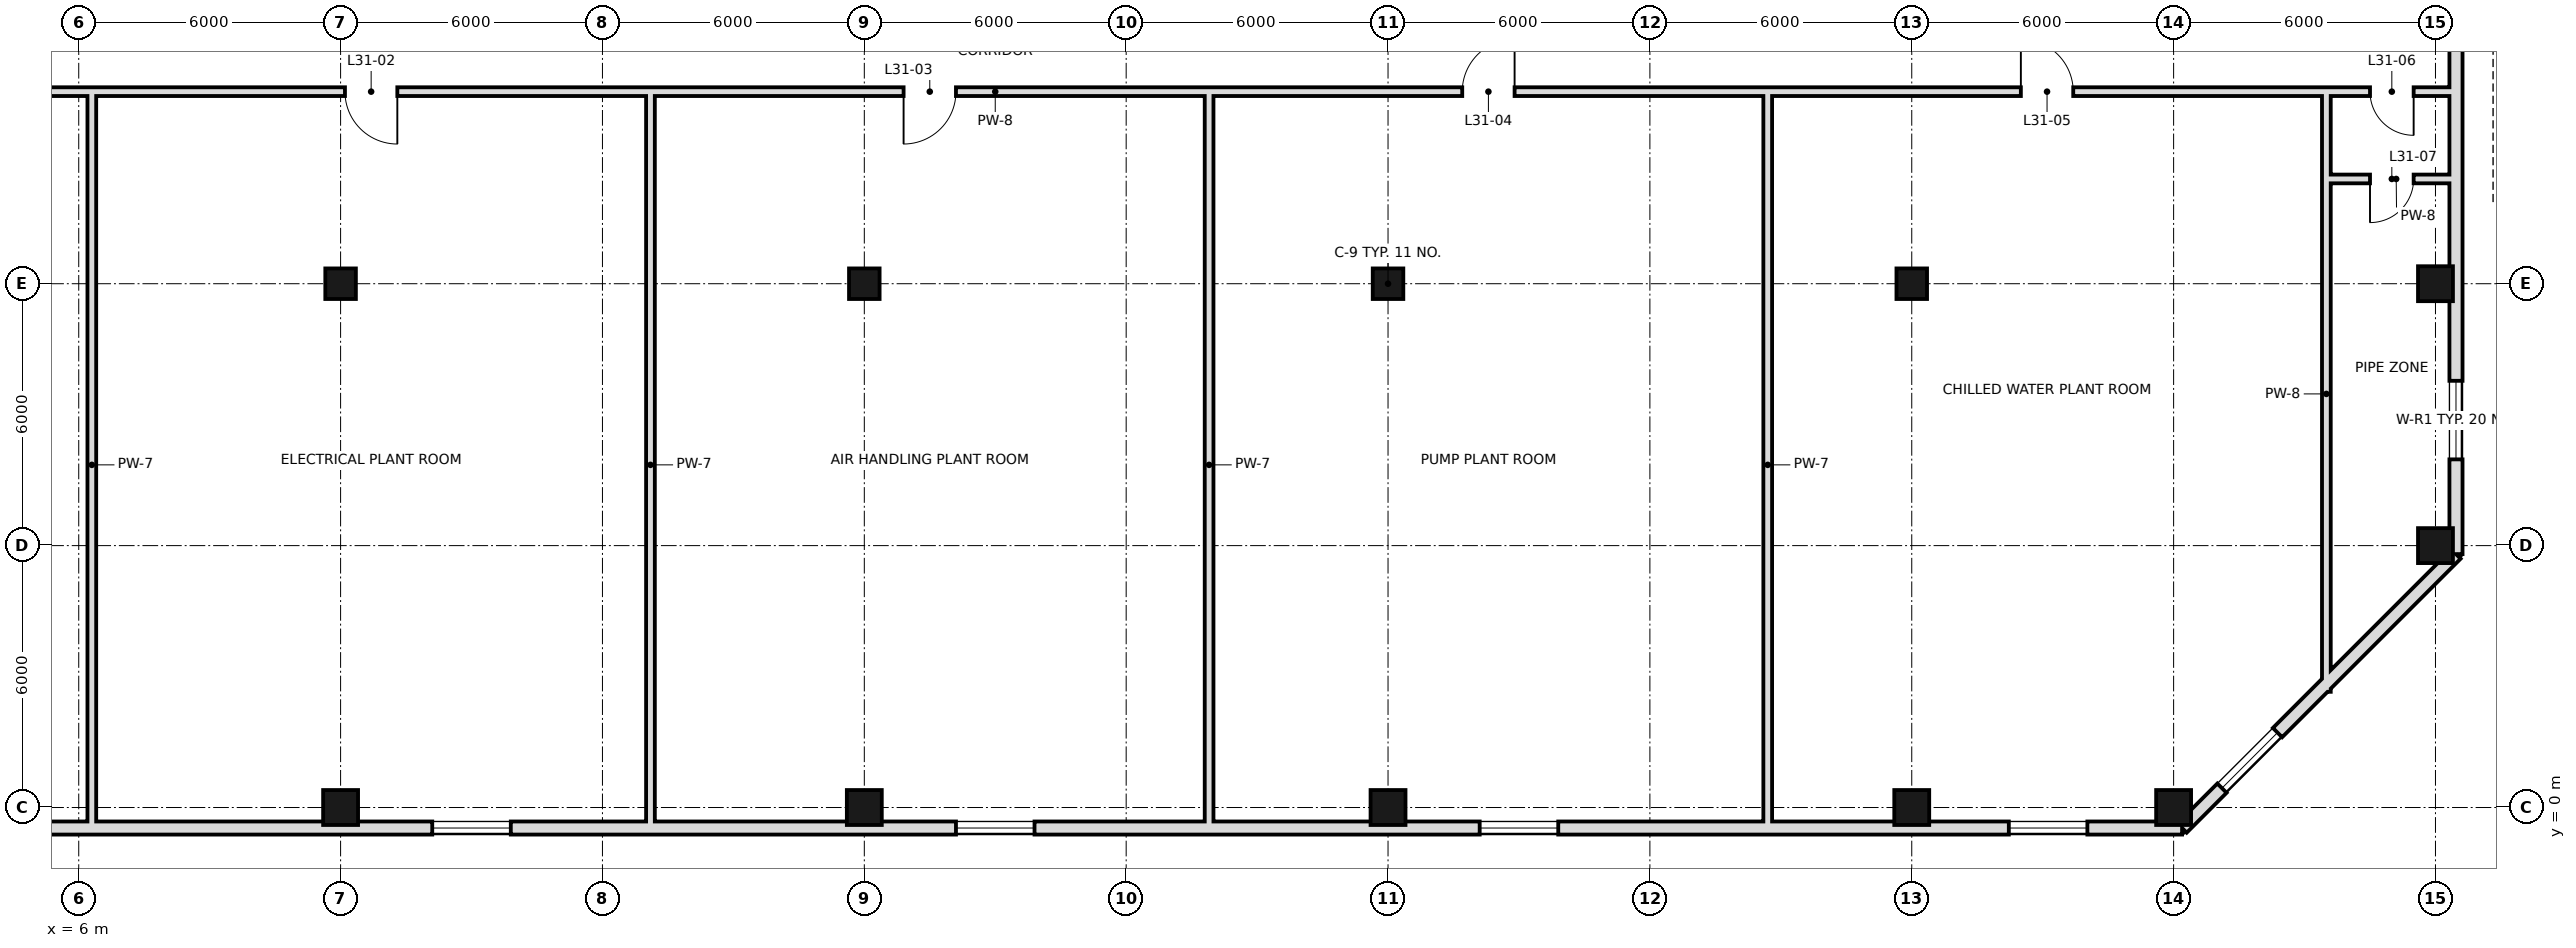
"""IFC4 building model, lengths in metres.
Left out: names, types, materials, properties, quantities, classifications, styles, units other than length and angle.
Written with IfcOpenShell. Run it as: python <this file> out.ifc"""

import sys

from ifc_helpers import new_model, si_unit, direction, frame, frame_2d, origin, origin_2d, place, context, subcontext, project, spatial, rectangle, hollow_rectangle, extrude, element, fill, save


model = new_model("IFC4")
c1 = context("Model", 3, precision=1e-05, world=origin(), true_north=direction((0.0, 1.0)))
c2 = subcontext(c1, "Body", "Model", "MODEL_VIEW")
j1 = project(units=[si_unit("LENGTHUNIT", "METRE"), si_unit("PLANEANGLEUNIT", "RADIAN")], contexts=[c1])
p1 = place(None, origin())
s1 = spatial("IfcSite", under=j1, at=p1, CompositionType="ELEMENT")
p2 = place(p1, origin())
s2 = spatial("IfcBuilding", under=s1, at=p2, CompositionType="ELEMENT")
p3 = place(p2, frame((0.0, 0.0, 138.4)))
s3 = spatial("IfcBuildingStorey", under=s2, at=p3, CompositionType="ELEMENT", Elevation=138.4)
p4 = place(p3, frame((12.0, 0.0, 0.0), z_axis=(0.0, 0.0, 1.0), x_axis=(1.0, 0.0, 0.0)))
e1 = element("IfcColumn", 1, at=p4, inside=s3, PredefinedType="COLUMN", context=c2, shape_type="SweptSolid", body=[
    extrude(hollow_rectangle(XDim=0.8, YDim=0.8, WallThickness=0.04, at=origin_2d()), origin(), (0.0, 0.0, 1.0), 5.4),
])
p5 = place(p3, frame((12.0, 12.0, 0.0), z_axis=(0.0, 0.0, 1.0), x_axis=(1.0, 0.0, 0.0)))
e2 = element("IfcColumn", 2, at=p5, inside=s3, PredefinedType="COLUMN", context=c2, shape_type="SweptSolid", body=[
    extrude(hollow_rectangle(XDim=0.7, YDim=0.7, WallThickness=0.036, at=origin_2d()), origin(), (0.0, 0.0, 1.0), 5.4),
])
p6 = place(p3, frame((24.0, 0.0, 0.0), z_axis=(0.0, 0.0, 1.0), x_axis=(1.0, 0.0, 0.0)))
e3 = element("IfcColumn", 3, at=p6, inside=s3, PredefinedType="COLUMN", context=c2, shape_type="SweptSolid", body=[
    extrude(hollow_rectangle(XDim=0.8, YDim=0.8, WallThickness=0.04, at=origin_2d()), origin(), (0.0, 0.0, 1.0), 5.4),
])
p7 = place(p3, frame((24.0, 12.0, 0.0), z_axis=(0.0, 0.0, 1.0), x_axis=(1.0, 0.0, 0.0)))
e4 = element("IfcColumn", 4, at=p7, inside=s3, PredefinedType="COLUMN", context=c2, shape_type="SweptSolid", body=[
    extrude(hollow_rectangle(XDim=0.7, YDim=0.7, WallThickness=0.036, at=origin_2d()), origin(), (0.0, 0.0, 1.0), 5.4),
])
p8 = place(p3, frame((36.0, 0.0, 0.0), z_axis=(0.0, 0.0, 1.0), x_axis=(1.0, 0.0, 0.0)))
e5 = element("IfcColumn", 5, at=p8, inside=s3, PredefinedType="COLUMN", context=c2, shape_type="SweptSolid", body=[
    extrude(hollow_rectangle(XDim=0.8, YDim=0.8, WallThickness=0.04, at=origin_2d()), origin(), (0.0, 0.0, 1.0), 5.4),
])
p9 = place(p3, frame((36.0, 12.0, 0.0), z_axis=(0.0, 0.0, 1.0), x_axis=(1.0, 0.0, 0.0)))
e6 = element("IfcColumn", 6, at=p9, inside=s3, PredefinedType="COLUMN", context=c2, shape_type="SweptSolid", body=[
    extrude(hollow_rectangle(XDim=0.7, YDim=0.7, WallThickness=0.036, at=origin_2d()), origin(), (0.0, 0.0, 1.0), 5.4),
])
p10 = place(p3, frame((48.0, 0.0, 0.0), z_axis=(0.0, 0.0, 1.0), x_axis=(1.0, 0.0, 0.0)))
e7 = element("IfcColumn", 7, at=p10, inside=s3, PredefinedType="COLUMN", context=c2, shape_type="SweptSolid", body=[
    extrude(hollow_rectangle(XDim=0.8, YDim=0.8, WallThickness=0.04, at=origin_2d()), origin(), (0.0, 0.0, 1.0), 5.4),
])
p11 = place(p3, frame((48.0, 12.0, 0.0), z_axis=(0.0, 0.0, 1.0), x_axis=(1.0, 0.0, 0.0)))
e8 = element("IfcColumn", 8, at=p11, inside=s3, PredefinedType="COLUMN", context=c2, shape_type="SweptSolid", body=[
    extrude(hollow_rectangle(XDim=0.7, YDim=0.7, WallThickness=0.036, at=origin_2d()), origin(), (0.0, 0.0, 1.0), 5.4),
])
for number, where, z_axis, x_axis in (
    (9, (54.0, 0.0, 0.0), (0.0, 0.0, 1.0), (1.0, 0.0, 0.0)),
    (10, (60.0, 6.0, 0.0), (0.0, 0.0, 1.0), (1.0, 0.0, 0.0)),
    (11, (60.0, 12.0, 0.0), (0.0, 0.0, 1.0), (1.0, 0.0, 0.0)),
):
    element("IfcColumn", number, at=place(p3, frame(where, z_axis=z_axis, x_axis=x_axis)), inside=s3, PredefinedType="COLUMN", context=c2, shape_type="SweptSolid", body=[
        extrude(hollow_rectangle(XDim=0.8, YDim=0.8, WallThickness=0.04, at=origin_2d()), origin(), (0.0, 0.0, 1.0), 5.4),
    ])
p12 = place(p3, frame((-0.195, -0.47, 0.0), z_axis=(0.0, 0.0, 1.0), x_axis=(1.0, 0.0, 0.0)))
e12 = element("IfcWall", 12, at=p12, inside=s3, PredefinedType="SOLIDWALL", context=c2, shape_type="SweptSolid", body=[
    extrude(rectangle(XDim=54.389, YDim=0.3, at=frame_2d((27.195, 0.0))), origin(), (0.0, 0.0, 1.0), 5.22),
])
p13 = place(p12, frame((2.17, 0.0, 0.9)))
e13 = element("IfcOpeningElement", 13, at=p13, cuts=e12, PredefinedType="OPENING", context=c2, shape_type="SweptSolid", body=[
    extrude(rectangle(XDim=1.8, YDim=1.5, at=frame_2d((0.9, 0.75))), frame((0.0, 0.16, 0.0), z_axis=(0.0, -1.0, 0.0), x_axis=(1.0, 0.0, 0.0)), (0.0, 0.0, 1.0), 0.32),
])
p14 = place(p12, frame((14.295, 0.0, 0.9)))
e14 = element("IfcOpeningElement", 14, at=p14, cuts=e12, PredefinedType="OPENING", context=c2, shape_type="SweptSolid", body=[
    extrude(rectangle(XDim=1.8, YDim=1.5, at=frame_2d((0.9, 0.75))), frame((0.0, 0.16, 0.0), z_axis=(0.0, -1.0, 0.0), x_axis=(1.0, 0.0, 0.0)), (0.0, 0.0, 1.0), 0.32),
])
p15 = place(p12, frame((26.295, 0.0, 0.9)))
e15 = element("IfcOpeningElement", 15, at=p15, cuts=e12, PredefinedType="OPENING", context=c2, shape_type="SweptSolid", body=[
    extrude(rectangle(XDim=1.8, YDim=1.5, at=frame_2d((0.9, 0.75))), frame((0.0, 0.16, 0.0), z_axis=(0.0, -1.0, 0.0), x_axis=(1.0, 0.0, 0.0)), (0.0, 0.0, 1.0), 0.32),
])
p16 = place(p12, frame((38.295, 0.0, 0.9)))
e16 = element("IfcOpeningElement", 16, at=p16, cuts=e12, PredefinedType="OPENING", context=c2, shape_type="SweptSolid", body=[
    extrude(rectangle(XDim=1.8, YDim=1.5, at=frame_2d((0.9, 0.75))), frame((0.0, 0.16, 0.0), z_axis=(0.0, -1.0, 0.0), x_axis=(1.0, 0.0, 0.0)), (0.0, 0.0, 1.0), 0.32),
])
p17 = place(p12, frame((50.419, 0.0, 0.9)))
e17 = element("IfcOpeningElement", 17, at=p17, cuts=e12, PredefinedType="OPENING", context=c2, shape_type="SweptSolid", body=[
    extrude(rectangle(XDim=1.8, YDim=1.5, at=frame_2d((0.9, 0.75))), frame((0.0, 0.16, 0.0), z_axis=(0.0, -1.0, 0.0), x_axis=(1.0, 0.0, 0.0)), (0.0, 0.0, 1.0), 0.32),
])
p18 = place(p3, frame((54.195, -0.47, 0.0), z_axis=(0.0, 0.0, 1.0), x_axis=(0.707106781187, 0.707106781187, 0.0)))
e18 = element("IfcWall", 18, at=p18, inside=s3, PredefinedType="SOLIDWALL", context=c2, shape_type="SweptSolid", body=[
    extrude(rectangle(XDim=8.875, YDim=0.3, at=frame_2d((4.438, 0.0))), origin(), (0.0, 0.0, 1.0), 5.22),
])
p19 = place(p18, frame((1.292, 0.0, 0.9)))
e19 = element("IfcOpeningElement", 19, at=p19, cuts=e18, PredefinedType="OPENING", context=c2, shape_type="SweptSolid", body=[
    extrude(rectangle(XDim=1.8, YDim=1.5, at=frame_2d((0.9, 0.75))), frame((0.0, 0.16, 0.0), z_axis=(0.0, -1.0, 0.0), x_axis=(1.0, 0.0, 0.0)), (0.0, 0.0, 1.0), 0.32),
])
p20 = place(p3, frame((60.47, 5.805, 0.0), z_axis=(0.0, 0.0, 1.0), x_axis=(0.0, 1.0, 0.0)))
e20 = element("IfcWall", 20, at=p20, inside=s3, PredefinedType="SOLIDWALL", context=c2, shape_type="SweptSolid", body=[
    extrude(rectangle(XDim=36.389, YDim=0.3, at=frame_2d((18.195, 0.0))), origin(), (0.0, 0.0, 1.0), 5.22),
])
p21 = place(p20, frame((2.17, 0.0, 0.9)))
e21 = element("IfcOpeningElement", 21, at=p21, cuts=e20, PredefinedType="OPENING", context=c2, shape_type="SweptSolid", body=[
    extrude(rectangle(XDim=1.8, YDim=1.5, at=frame_2d((0.9, 0.75))), frame((0.0, 0.16, 0.0), z_axis=(0.0, -1.0, 0.0), x_axis=(1.0, 0.0, 0.0)), (0.0, 0.0, 1.0), 0.32),
])
p22 = place(p20, frame((14.295, 0.0, 0.9)))
e22 = element("IfcOpeningElement", 22, at=p22, cuts=e20, PredefinedType="OPENING", context=c2, shape_type="SweptSolid", body=[
    extrude(rectangle(XDim=1.8, YDim=1.5, at=frame_2d((0.9, 0.75))), frame((0.0, 0.16, 0.0), z_axis=(0.0, -1.0, 0.0), x_axis=(1.0, 0.0, 0.0)), (0.0, 0.0, 1.0), 0.32),
])
p23 = place(p20, frame((26.295, 0.0, 0.9)))
e23 = element("IfcOpeningElement", 23, at=p23, cuts=e20, PredefinedType="OPENING", context=c2, shape_type="SweptSolid", body=[
    extrude(rectangle(XDim=1.8, YDim=1.5, at=frame_2d((0.9, 0.75))), frame((0.0, 0.16, 0.0), z_axis=(0.0, -1.0, 0.0), x_axis=(1.0, 0.0, 0.0)), (0.0, 0.0, 1.0), 0.32),
])
for number, where, z_axis, x_axis in (
    (24, (6.3, -0.6, 0.0), (0.0, 0.0, 1.0), (0.0, 1.0, 0.0)),
    (25, (19.1, -0.6, 0.0), (0.0, 0.0, 1.0), (0.0, 1.0, 0.0)),
    (26, (31.9, -0.6, 0.0), (0.0, 0.0, 1.0), (0.0, 1.0, 0.0)),
    (27, (44.7, -0.6, 0.0), (0.0, 0.0, 1.0), (0.0, 1.0, 0.0)),
):
    element("IfcWall", number, at=place(p3, frame(where, z_axis=z_axis, x_axis=x_axis)), inside=s3, PredefinedType="SOLIDWALL", context=c2, shape_type="SweptSolid", body=[
        extrude(rectangle(XDim=16.9, YDim=0.2, at=frame_2d((8.45, 0.0))), origin(), (0.0, 0.0, 1.0), 4.52),
    ])
p24 = place(p3, frame((57.5, 2.651, 0.0), z_axis=(0.0, 0.0, 1.0), x_axis=(0.0, 1.0, 0.0)))
e28 = element("IfcWall", 28, at=p24, inside=s3, PredefinedType="SOLIDWALL", context=c2, shape_type="SweptSolid", body=[
    extrude(rectangle(XDim=13.649, YDim=0.2, at=frame_2d((6.825, 0.0))), origin(), (0.0, 0.0, 1.0), 4.52),
])
p25 = place(p3, frame((57.6, 14.4, 0.0), z_axis=(0.0, 0.0, 1.0), x_axis=(1.0, 0.0, 0.0)))
e29 = element("IfcWall", 29, at=p25, inside=s3, PredefinedType="SOLIDWALL", context=c2, shape_type="SweptSolid", body=[
    extrude(rectangle(XDim=3.0, YDim=0.2, at=frame_2d((1.5, 0.0))), origin(), (0.0, 0.0, 1.0), 4.52),
])
p26 = place(p25, frame((0.9, 0.0, 0.0)))
e30 = element("IfcOpeningElement", 30, at=p26, cuts=e29, PredefinedType="OPENING", context=c2, shape_type="SweptSolid", body=[
    extrude(rectangle(XDim=1.0, YDim=2.4, at=frame_2d((0.5, 1.2))), frame((0.0, 0.11, 0.0), z_axis=(0.0, -1.0, 0.0), x_axis=(1.0, 0.0, 0.0)), (0.0, 0.0, 1.0), 0.22),
])
p27 = place(p3, frame((-6.6, 16.4, 0.0), z_axis=(0.0, 0.0, 1.0), x_axis=(1.0, 0.0, 0.0)))
e31 = element("IfcWall", 31, at=p27, inside=s3, PredefinedType="SOLIDWALL", context=c2, shape_type="SweptSolid", body=[
    extrude(rectangle(XDim=67.2, YDim=0.2, at=frame_2d((33.6, 0.0))), origin(), (0.0, 0.0, 1.0), 4.52),
])
p28 = place(p27, frame((5.9, 0.0, 0.0)))
e32 = element("IfcOpeningElement", 32, at=p28, cuts=e31, PredefinedType="OPENING", context=c2, shape_type="SweptSolid", body=[
    extrude(rectangle(XDim=1.2, YDim=2.4, at=frame_2d((0.6, 1.2))), frame((0.0, 0.11, 0.0), z_axis=(0.0, -1.0, 0.0), x_axis=(1.0, 0.0, 0.0)), (0.0, 0.0, 1.0), 0.22),
])
p29 = place(p27, frame((18.7, 0.0, 0.0)))
e33 = element("IfcOpeningElement", 33, at=p29, cuts=e31, PredefinedType="OPENING", context=c2, shape_type="SweptSolid", body=[
    extrude(rectangle(XDim=1.2, YDim=2.4, at=frame_2d((0.6, 1.2))), frame((0.0, 0.11, 0.0), z_axis=(0.0, -1.0, 0.0), x_axis=(1.0, 0.0, 0.0)), (0.0, 0.0, 1.0), 0.22),
])
p30 = place(p27, frame((31.5, 0.0, 0.0)))
e34 = element("IfcOpeningElement", 34, at=p30, cuts=e31, PredefinedType="OPENING", context=c2, shape_type="SweptSolid", body=[
    extrude(rectangle(XDim=1.2, YDim=2.4, at=frame_2d((0.6, 1.2))), frame((0.0, 0.11, 0.0), z_axis=(0.0, -1.0, 0.0), x_axis=(1.0, 0.0, 0.0)), (0.0, 0.0, 1.0), 0.22),
])
p31 = place(p27, frame((44.3, 0.0, 0.0)))
e35 = element("IfcOpeningElement", 35, at=p31, cuts=e31, PredefinedType="OPENING", context=c2, shape_type="SweptSolid", body=[
    extrude(rectangle(XDim=1.2, YDim=2.4, at=frame_2d((0.6, 1.2))), frame((0.0, 0.11, 0.0), z_axis=(0.0, -1.0, 0.0), x_axis=(1.0, 0.0, 0.0)), (0.0, 0.0, 1.0), 0.22),
])
p32 = place(p27, frame((57.1, 0.0, 0.0)))
e36 = element("IfcOpeningElement", 36, at=p32, cuts=e31, PredefinedType="OPENING", context=c2, shape_type="SweptSolid", body=[
    extrude(rectangle(XDim=1.2, YDim=2.4, at=frame_2d((0.6, 1.2))), frame((0.0, 0.11, 0.0), z_axis=(0.0, -1.0, 0.0), x_axis=(1.0, 0.0, 0.0)), (0.0, 0.0, 1.0), 0.22),
])
p33 = place(p27, frame((65.1, 0.0, 0.0)))
e37 = element("IfcOpeningElement", 37, at=p33, cuts=e31, PredefinedType="OPENING", context=c2, shape_type="SweptSolid", body=[
    extrude(rectangle(XDim=1.0, YDim=2.4, at=frame_2d((0.5, 1.2))), frame((0.0, 0.11, 0.0), z_axis=(0.0, -1.0, 0.0), x_axis=(1.0, 0.0, 0.0)), (0.0, 0.0, 1.0), 0.22),
])
p34 = place(p14, origin())
e38 = element("IfcWindow", 38, at=p34, inside=s3, PartitioningType="SINGLE_PANEL", PredefinedType="WINDOW", context=c2, shape_type="SweptSolid", body=[
    extrude(rectangle(XDim=1.8, YDim=1.5, at=frame_2d((0.9, 0.75))), frame((0.0, 0.03, 0.0), z_axis=(0.0, -1.0, 0.0), x_axis=(1.0, 0.0, 0.0)), (0.0, 0.0, 1.0), 0.06),
])
fill(e14, e38)
p35 = place(p15, origin())
e39 = element("IfcWindow", 39, at=p35, inside=s3, PartitioningType="SINGLE_PANEL", PredefinedType="WINDOW", context=c2, shape_type="SweptSolid", body=[
    extrude(rectangle(XDim=1.8, YDim=1.5, at=frame_2d((0.9, 0.75))), frame((0.0, 0.03, 0.0), z_axis=(0.0, -1.0, 0.0), x_axis=(1.0, 0.0, 0.0)), (0.0, 0.0, 1.0), 0.06),
])
fill(e15, e39)
p36 = place(p16, origin())
e40 = element("IfcWindow", 40, at=p36, inside=s3, PartitioningType="SINGLE_PANEL", PredefinedType="WINDOW", context=c2, shape_type="SweptSolid", body=[
    extrude(rectangle(XDim=1.8, YDim=1.5, at=frame_2d((0.9, 0.75))), frame((0.0, 0.03, 0.0), z_axis=(0.0, -1.0, 0.0), x_axis=(1.0, 0.0, 0.0)), (0.0, 0.0, 1.0), 0.06),
])
fill(e16, e40)
p37 = place(p17, origin())
e41 = element("IfcWindow", 41, at=p37, inside=s3, PartitioningType="SINGLE_PANEL", PredefinedType="WINDOW", context=c2, shape_type="SweptSolid", body=[
    extrude(rectangle(XDim=1.8, YDim=1.5, at=frame_2d((0.9, 0.75))), frame((0.0, 0.03, 0.0), z_axis=(0.0, -1.0, 0.0), x_axis=(1.0, 0.0, 0.0)), (0.0, 0.0, 1.0), 0.06),
])
fill(e17, e41)
p38 = place(p19, origin())
e42 = element("IfcWindow", 42, at=p38, inside=s3, PartitioningType="SINGLE_PANEL", PredefinedType="WINDOW", context=c2, shape_type="SweptSolid", body=[
    extrude(rectangle(XDim=1.8, YDim=1.5, at=frame_2d((0.9, 0.75))), frame((0.0, 0.03, 0.0), z_axis=(0.0, -1.0, 0.0), x_axis=(1.0, 0.0, 0.0)), (0.0, 0.0, 1.0), 0.06),
])
fill(e19, e42)
p39 = place(p21, origin())
e43 = element("IfcWindow", 43, at=p39, inside=s3, PartitioningType="SINGLE_PANEL", PredefinedType="WINDOW", context=c2, shape_type="SweptSolid", body=[
    extrude(rectangle(XDim=1.8, YDim=1.5, at=frame_2d((0.9, 0.75))), frame((0.0, 0.03, 0.0), z_axis=(0.0, -1.0, 0.0), x_axis=(1.0, 0.0, 0.0)), (0.0, 0.0, 1.0), 0.06),
])
fill(e21, e43)
p40 = place(p29, origin())
e44 = element("IfcDoor", 44, at=p40, inside=s3, OperationType="SINGLE_SWING_RIGHT", PredefinedType="DOOR", context=c2, shape_type="SweptSolid", body=[
    extrude(rectangle(XDim=1.2, YDim=2.4, at=frame_2d((0.6, 1.2))), frame((0.0, 0.025, 0.0), z_axis=(0.0, -1.0, 0.0), x_axis=(1.0, 0.0, 0.0)), (0.0, 0.0, 1.0), 0.05),
])
fill(e33, e44)
p41 = place(p30, frame((1.2, 0.0, 0.0), z_axis=(0.0, 0.0, 1.0), x_axis=(-1.0, 0.0, 0.0)))
e45 = element("IfcDoor", 45, at=p41, inside=s3, OperationType="SINGLE_SWING_RIGHT", PredefinedType="DOOR", context=c2, shape_type="SweptSolid", body=[
    extrude(rectangle(XDim=1.2, YDim=2.4, at=frame_2d((0.6, 1.2))), frame((0.0, 0.025, 0.0), z_axis=(0.0, -1.0, 0.0), x_axis=(1.0, 0.0, 0.0)), (0.0, 0.0, 1.0), 0.05),
])
fill(e34, e45)
p42 = place(p31, frame((1.2, 0.0, 0.0), z_axis=(0.0, 0.0, 1.0), x_axis=(-1.0, 0.0, 0.0)))
e46 = element("IfcDoor", 46, at=p42, inside=s3, OperationType="SINGLE_SWING_LEFT", PredefinedType="DOOR", context=c2, shape_type="SweptSolid", body=[
    extrude(rectangle(XDim=1.2, YDim=2.4, at=frame_2d((0.6, 1.2))), frame((0.0, 0.025, 0.0), z_axis=(0.0, -1.0, 0.0), x_axis=(1.0, 0.0, 0.0)), (0.0, 0.0, 1.0), 0.05),
])
fill(e35, e46)
p43 = place(p32, origin())
e47 = element("IfcDoor", 47, at=p43, inside=s3, OperationType="SINGLE_SWING_LEFT", PredefinedType="DOOR", context=c2, shape_type="SweptSolid", body=[
    extrude(rectangle(XDim=1.2, YDim=2.4, at=frame_2d((0.6, 1.2))), frame((0.0, 0.025, 0.0), z_axis=(0.0, -1.0, 0.0), x_axis=(1.0, 0.0, 0.0)), (0.0, 0.0, 1.0), 0.05),
])
fill(e36, e47)
p44 = place(p33, origin())
e48 = element("IfcDoor", 48, at=p44, inside=s3, OperationType="SINGLE_SWING_RIGHT", PredefinedType="DOOR", context=c2, shape_type="SweptSolid", body=[
    extrude(rectangle(XDim=1.0, YDim=2.4, at=frame_2d((0.5, 1.2))), frame((0.0, 0.025, 0.0), z_axis=(0.0, -1.0, 0.0), x_axis=(1.0, 0.0, 0.0)), (0.0, 0.0, 1.0), 0.05),
])
fill(e37, e48)
p45 = place(p26, frame((1.0, 0.0, 0.0), z_axis=(0.0, 0.0, 1.0), x_axis=(-1.0, 0.0, 0.0)))
e49 = element("IfcDoor", 49, at=p45, inside=s3, OperationType="SINGLE_SWING_RIGHT", PredefinedType="DOOR", context=c2, shape_type="SweptSolid", body=[
    extrude(rectangle(XDim=1.0, YDim=2.4, at=frame_2d((0.5, 1.2))), frame((0.0, 0.025, 0.0), z_axis=(0.0, -1.0, 0.0), x_axis=(1.0, 0.0, 0.0)), (0.0, 0.0, 1.0), 0.05),
])
fill(e30, e49)
save(model, sys.argv[1])
